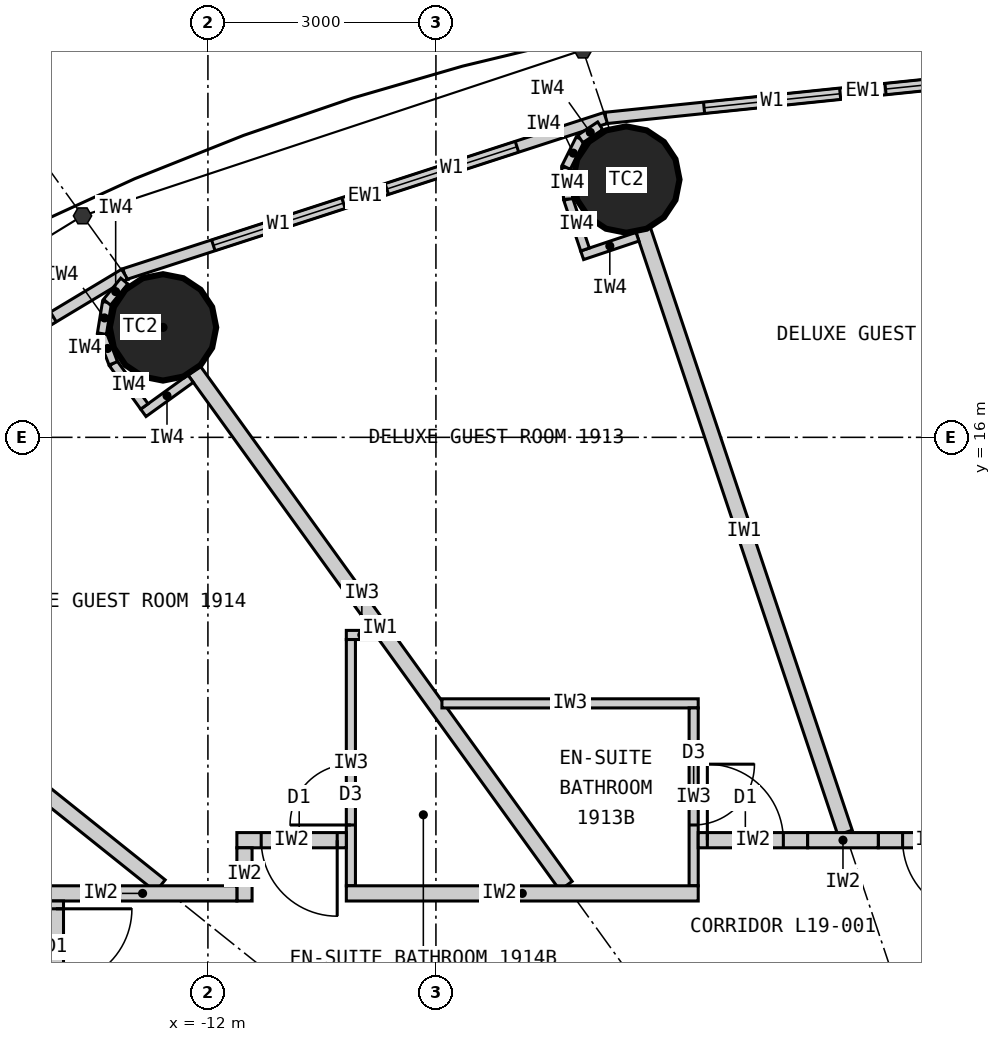
"""IFC4 building model, lengths in metres.
Left out: names, types, materials, properties, quantities, classifications, styles, units other than length and angle.
Written with IfcOpenShell. Run it as: python <this file> out.ifc"""

import sys

from ifc_helpers import new_model, si_unit, direction, frame, frame_2d, origin, origin_2d, place, context, subcontext, project, spatial, rectangle, circle, extrude, element, fill, save


model = new_model("IFC4")
c1 = context("Model", 3, precision=1e-05, world=origin(), true_north=direction((0.0, 1.0)))
c2 = subcontext(c1, "Body", "Model", "MODEL_VIEW")
j1 = project(units=[si_unit("LENGTHUNIT", "METRE"), si_unit("PLANEANGLEUNIT", "RADIAN")], contexts=[c1])
p1 = place(None, origin())
s1 = spatial("IfcSite", under=j1, at=p1, CompositionType="ELEMENT")
p2 = place(p1, origin())
s2 = spatial("IfcBuilding", under=s1, at=p2, CompositionType="ELEMENT")
p3 = place(p2, frame((0.0, 0.0, 77.1)))
s3 = spatial("IfcBuildingStorey", under=s2, at=p3, CompositionType="ELEMENT", Elevation=77.1)
for number, where, z_axis, x_axis in (
    (1, (-6.495, 19.391, 0.0), (0.0, 0.0, 1.0), (1.0, 0.0, 0.0)),
    (2, (-12.591, 17.447, 0.0), (0.0, 0.0, 1.0), (1.0, 0.0, 0.0)),
):
    element("IfcColumn", number, at=place(p3, frame(where, z_axis=z_axis, x_axis=x_axis)), inside=s3, PredefinedType="COLUMN", context=c2, shape_type="SweptSolid", body=[
        extrude(circle(Radius=0.7, at=origin_2d()), origin(), (0.0, 0.0, 1.0), 3.3),
    ])
p4 = place(p3, frame((0.0, 20.9, 0.0), z_axis=(0.0, 0.0, 1.0), x_axis=(-0.994721394369, -0.102612609291, 0.0)))
e3 = element("IfcWall", 3, at=p4, inside=s3, PredefinedType="ELEMENTEDWALL", context=c2, shape_type="SweptSolid", body=[
    extrude(rectangle(XDim=6.802, YDim=0.15, at=frame_2d((3.401, 0.0))), origin(), (0.0, 0.0, 1.0), 3.12),
])
p5 = place(p4, frame((1.301, 0.0, 0.9)))
e4 = element("IfcOpeningElement", 4, at=p5, cuts=e3, PredefinedType="OPENING", context=c2, shape_type="SweptSolid", body=[
    extrude(rectangle(XDim=1.8, YDim=1.9, at=frame_2d((0.9, 0.95))), frame((0.0, 0.085, 0.0), z_axis=(0.0, -1.0, 0.0), x_axis=(1.0, 0.0, 0.0)), (0.0, 0.0, 1.0), 0.17),
])
p6 = place(p4, frame((3.701, 0.0, 0.9)))
e5 = element("IfcOpeningElement", 5, at=p6, cuts=e3, PredefinedType="OPENING", context=c2, shape_type="SweptSolid", body=[
    extrude(rectangle(XDim=1.8, YDim=1.9, at=frame_2d((0.9, 0.95))), frame((0.0, 0.085, 0.0), z_axis=(0.0, -1.0, 0.0), x_axis=(1.0, 0.0, 0.0)), (0.0, 0.0, 1.0), 0.17),
])
p7 = place(p3, frame((-6.766, 20.202, 0.0), z_axis=(0.0, 0.0, 1.0), x_axis=(-0.951137534625, -0.308767534285, 0.0)))
e6 = element("IfcWall", 6, at=p7, inside=s3, PredefinedType="ELEMENTEDWALL", context=c2, shape_type="SweptSolid", body=[
    extrude(rectangle(XDim=6.655, YDim=0.15, at=frame_2d((3.328, 0.0))), origin(), (0.0, 0.0, 1.0), 3.12),
])
p8 = place(p7, frame((1.228, 0.0, 0.9)))
e7 = element("IfcOpeningElement", 7, at=p8, cuts=e6, PredefinedType="OPENING", context=c2, shape_type="SweptSolid", body=[
    extrude(rectangle(XDim=1.8, YDim=1.9, at=frame_2d((0.9, 0.95))), frame((0.0, 0.085, 0.0), z_axis=(0.0, -1.0, 0.0), x_axis=(1.0, 0.0, 0.0)), (0.0, 0.0, 1.0), 0.17),
])
p9 = place(p7, frame((3.628, 0.0, 0.9)))
e8 = element("IfcOpeningElement", 8, at=p9, cuts=e6, PredefinedType="OPENING", context=c2, shape_type="SweptSolid", body=[
    extrude(rectangle(XDim=1.8, YDim=1.9, at=frame_2d((0.9, 0.95))), frame((0.0, 0.085, 0.0), z_axis=(0.0, -1.0, 0.0), x_axis=(1.0, 0.0, 0.0)), (0.0, 0.0, 1.0), 0.17),
])
p10 = place(p3, frame((-13.096, 18.147, 0.0), z_axis=(0.0, 0.0, 1.0), x_axis=(-0.856983180864, -0.515344377787, 0.0)))
e9 = element("IfcWall", 9, at=p10, inside=s3, PredefinedType="ELEMENTEDWALL", context=c2, shape_type="SweptSolid", body=[
    extrude(rectangle(XDim=6.386, YDim=0.15, at=frame_2d((3.193, 0.0))), origin(), (0.0, 0.0, 1.0), 3.12),
])
p11 = place(p10, frame((1.093, 0.0, 0.9)))
e10 = element("IfcOpeningElement", 10, at=p11, cuts=e9, PredefinedType="OPENING", context=c2, shape_type="SweptSolid", body=[
    extrude(rectangle(XDim=1.8, YDim=1.9, at=frame_2d((0.9, 0.95))), frame((0.0, 0.085, 0.0), z_axis=(0.0, -1.0, 0.0), x_axis=(1.0, 0.0, 0.0)), (0.0, 0.0, 1.0), 0.17),
])
p12 = place(p10, frame((3.493, 0.0, 0.9)))
e11 = element("IfcOpeningElement", 11, at=p12, cuts=e9, PredefinedType="OPENING", context=c2, shape_type="SweptSolid", body=[
    extrude(rectangle(XDim=1.8, YDim=1.9, at=frame_2d((0.9, 0.95))), frame((0.0, 0.085, 0.0), z_axis=(0.0, -1.0, 0.0), x_axis=(1.0, 0.0, 0.0)), (0.0, 0.0, 1.0), 0.17),
])
p13 = place(p3, frame((-3.617, 10.8, 0.0), z_axis=(0.0, 0.0, 1.0), x_axis=(-0.317576599239, 0.948232621046, 0.0)))
e12 = element("IfcWall", 12, at=p13, inside=s3, PredefinedType="PARTITIONING", context=c2, shape_type="SweptSolid", body=[
    extrude(rectangle(XDim=8.36, YDim=0.2, at=frame_2d((4.18, 0.0))), origin(), (0.0, 0.0, 1.0), 2.32),
])
p14 = place(p3, frame((-7.289, 10.1, 0.0), z_axis=(0.0, 0.0, 1.0), x_axis=(-0.585198353053, 0.810890182197, 0.0)))
e13 = element("IfcWall", 13, at=p14, inside=s3, PredefinedType="PARTITIONING", context=c2, shape_type="SweptSolid", body=[
    extrude(rectangle(XDim=8.36, YDim=0.2, at=frame_2d((4.18, 0.0))), origin(), (0.0, 0.0, 1.0), 2.32),
])
p15 = place(p3, frame((-12.625, 10.1, 0.0), z_axis=(0.0, 0.0, 1.0), x_axis=(-0.780892451574, 0.624665493744, 0.0)))
e14 = element("IfcWall", 14, at=p15, inside=s3, PredefinedType="PARTITIONING", context=c2, shape_type="SweptSolid", body=[
    extrude(rectangle(XDim=6.045, YDim=0.2, at=frame_2d((3.022, 0.0))), origin(), (0.0, 0.0, 1.0), 2.32),
])
p16 = place(p3, frame((-8.921, 12.5, 0.0), z_axis=(0.0, 0.0, 1.0), x_axis=(1.0, 0.0, 0.0)))
e15 = element("IfcWall", 15, at=p16, inside=s3, PredefinedType="PARTITIONING", context=c2, shape_type="SweptSolid", body=[
    extrude(rectangle(XDim=3.372, YDim=0.12, at=frame_2d((1.686, 0.0))), origin(), (0.0, 0.0, 1.0), 3.12),
])
p17 = place(p3, frame((-5.609, 10.1, 0.0), z_axis=(0.0, 0.0, 1.0), x_axis=(0.0, 1.0, 0.0)))
e16 = element("IfcWall", 16, at=p17, inside=s3, PredefinedType="PARTITIONING", context=c2, shape_type="SweptSolid", body=[
    extrude(rectangle(XDim=2.34, YDim=0.12, at=frame_2d((1.17, 0.0))), origin(), (0.0, 0.0, 1.0), 3.12),
])
p18 = place(p17, frame((0.8, 0.0, 0.0)))
e17 = element("IfcOpeningElement", 17, at=p18, cuts=e16, PredefinedType="OPENING", context=c2, shape_type="SweptSolid", body=[
    extrude(rectangle(XDim=0.8, YDim=2.1, at=frame_2d((0.4, 1.05))), frame((0.0, 0.07, 0.0), z_axis=(0.0, -1.0, 0.0), x_axis=(1.0, 0.0, 0.0)), (0.0, 0.0, 1.0), 0.14),
])
p19 = place(p3, frame((-9.771, 13.4, 0.0), z_axis=(0.0, 0.0, 1.0), x_axis=(-1.0, 0.0, 0.0)))
e18 = element("IfcWall", 18, at=p19, inside=s3, PredefinedType="PARTITIONING", context=c2, shape_type="SweptSolid", body=[
    extrude(rectangle(XDim=0.408, YDim=0.12, at=frame_2d((0.204, 0.0))), origin(), (0.0, 0.0, 1.0), 3.12),
])
p20 = place(p3, frame((-10.119, 10.1, 0.0), z_axis=(0.0, 0.0, 1.0), x_axis=(0.0, 1.0, 0.0)))
e19 = element("IfcWall", 19, at=p20, inside=s3, PredefinedType="PARTITIONING", context=c2, shape_type="SweptSolid", body=[
    extrude(rectangle(XDim=3.24, YDim=0.12, at=frame_2d((1.62, 0.0))), origin(), (0.0, 0.0, 1.0), 3.12),
])
p21 = place(p20, frame((0.8, 0.0, 0.0)))
e20 = element("IfcOpeningElement", 20, at=p21, cuts=e19, PredefinedType="OPENING", context=c2, shape_type="SweptSolid", body=[
    extrude(rectangle(XDim=0.8, YDim=2.1, at=frame_2d((0.4, 1.05))), frame((0.0, 0.07, 0.0), z_axis=(0.0, -1.0, 0.0), x_axis=(1.0, 0.0, 0.0)), (0.0, 0.0, 1.0), 0.14),
])
p22 = place(p3, frame((-3.18, 10.7, 0.0), z_axis=(0.0, 0.0, 1.0), x_axis=(1.0, 0.0, 0.0)))
e21 = element("IfcWall", 21, at=p22, inside=s3, PredefinedType="PARTITIONING", context=c2, shape_type="SweptSolid", body=[
    extrude(rectangle(XDim=1.44, YDim=0.2, at=frame_2d((0.72, 0.0))), origin(), (0.0, 0.0, 1.0), 3.12),
])
p23 = place(p22, frame((0.32, 0.0, 0.0)))
e22 = element("IfcOpeningElement", 22, at=p23, cuts=e21, PredefinedType="OPENING", context=c2, shape_type="SweptSolid", body=[
    extrude(rectangle(XDim=1.0, YDim=2.2, at=frame_2d((0.5, 1.1))), frame((0.0, 0.11, 0.0), z_axis=(0.0, -1.0, 0.0), x_axis=(1.0, 0.0, 0.0)), (0.0, 0.0, 1.0), 0.22),
])
p24 = place(p3, frame((-5.549, 10.7, 0.0), z_axis=(0.0, 0.0, 1.0), x_axis=(1.0, 0.0, 0.0)))
e23 = element("IfcWall", 23, at=p24, inside=s3, PredefinedType="PARTITIONING", context=c2, shape_type="SweptSolid", body=[
    extrude(rectangle(XDim=1.44, YDim=0.2, at=frame_2d((0.72, 0.0))), origin(), (0.0, 0.0, 1.0), 3.12),
])
p25 = place(p24, frame((0.12, 0.0, 0.0)))
e24 = element("IfcOpeningElement", 24, at=p25, cuts=e23, PredefinedType="OPENING", context=c2, shape_type="SweptSolid", body=[
    extrude(rectangle(XDim=1.0, YDim=2.2, at=frame_2d((0.5, 1.1))), frame((0.0, 0.11, 0.0), z_axis=(0.0, -1.0, 0.0), x_axis=(1.0, 0.0, 0.0)), (0.0, 0.0, 1.0), 0.22),
])
p26 = place(p3, frame((-11.619, 10.7, 0.0), z_axis=(0.0, 0.0, 1.0), x_axis=(1.0, 0.0, 0.0)))
e25 = element("IfcWall", 25, at=p26, inside=s3, PredefinedType="PARTITIONING", context=c2, shape_type="SweptSolid", body=[
    extrude(rectangle(XDim=1.44, YDim=0.2, at=frame_2d((0.72, 0.0))), origin(), (0.0, 0.0, 1.0), 3.12),
])
p27 = place(p26, frame((0.32, 0.0, 0.0)))
e26 = element("IfcOpeningElement", 26, at=p27, cuts=e25, PredefinedType="OPENING", context=c2, shape_type="SweptSolid", body=[
    extrude(rectangle(XDim=1.0, YDim=2.2, at=frame_2d((0.5, 1.1))), frame((0.0, 0.11, 0.0), z_axis=(0.0, -1.0, 0.0), x_axis=(1.0, 0.0, 0.0)), (0.0, 0.0, 1.0), 0.22),
])
p28 = place(p3, frame((-11.519, 9.9, 0.0), z_axis=(0.0, 0.0, 1.0), x_axis=(0.0, 1.0, 0.0)))
e27 = element("IfcWall", 27, at=p28, inside=s3, PredefinedType="PARTITIONING", context=c2, shape_type="SweptSolid", body=[
    extrude(rectangle(XDim=0.7, YDim=0.2, at=frame_2d((0.35, 0.0))), origin(), (0.0, 0.0, 1.0), 3.12),
])
p29 = place(p3, frame((-4.109, 10.7, 0.0), z_axis=(0.0, 0.0, 1.0), x_axis=(1.0, 0.0, 0.0)))
e28 = element("IfcWall", 28, at=p29, inside=s3, PredefinedType="PARTITIONING", context=c2, shape_type="SweptSolid", body=[
    extrude(rectangle(XDim=0.929, YDim=0.2, at=frame_2d((0.465, 0.0))), origin(), (0.0, 0.0, 1.0), 3.12),
])
p30 = place(p3, frame((-14.1, 10.0, 0.0), z_axis=(0.0, 0.0, 1.0), x_axis=(1.0, 0.0, 0.0)))
e29 = element("IfcWall", 29, at=p30, inside=s3, PredefinedType="PARTITIONING", context=c2, shape_type="SweptSolid", body=[
    extrude(rectangle(XDim=2.481, YDim=0.2, at=frame_2d((1.24, 0.0))), origin(), (0.0, 0.0, 1.0), 3.12),
])
p31 = place(p3, frame((-10.179, 10.0, 0.0), z_axis=(0.0, 0.0, 1.0), x_axis=(1.0, 0.0, 0.0)))
e30 = element("IfcWall", 30, at=p31, inside=s3, PredefinedType="PARTITIONING", context=c2, shape_type="SweptSolid", body=[
    extrude(rectangle(XDim=4.63, YDim=0.2, at=frame_2d((2.315, 0.0))), origin(), (0.0, 0.0, 1.0), 3.12),
])
p32 = place(p3, frame((-14.0, 9.9, 0.0), z_axis=(0.0, 0.0, 1.0), x_axis=(0.0, -1.0, 0.0)))
e31 = element("IfcWall", 31, at=p32, inside=s3, PredefinedType="PARTITIONING", context=c2, shape_type="SweptSolid", body=[
    extrude(rectangle(XDim=5.127, YDim=0.2, at=frame_2d((2.564, 0.0))), origin(), (0.0, 0.0, 1.0), 3.12),
])
p33 = place(p32, frame((0.103, 0.0, 0.0)))
e32 = element("IfcOpeningElement", 32, at=p33, cuts=e31, PredefinedType="OPENING", context=c2, shape_type="SweptSolid", body=[
    extrude(rectangle(XDim=1.0, YDim=2.2, at=frame_2d((0.5, 1.1))), frame((0.0, 0.11, 0.0), z_axis=(0.0, -1.0, 0.0), x_axis=(1.0, 0.0, 0.0)), (0.0, 0.0, 1.0), 0.22),
])
p34 = place(p3, frame((-6.348, 18.639, 0.0), z_axis=(0.0, 0.0, 1.0), x_axis=(-0.948268951266, -0.317468102437, 0.0)))
e33 = element("IfcWall", 33, at=p34, inside=s3, PredefinedType="PARTITIONING", context=c2, shape_type="SweptSolid", body=[
    extrude(rectangle(XDim=0.768, YDim=0.12, at=frame_2d((0.384, 0.0))), origin(), (0.0, 0.0, 1.0), 3.12),
])
p35 = place(p3, frame((-7.038, 18.471, 0.0), z_axis=(0.0, 0.0, 1.0), x_axis=(-0.317378466199, 0.9482989556, 0.0)))
e34 = element("IfcWall", 34, at=p35, inside=s3, PredefinedType="PARTITIONING", context=c2, shape_type="SweptSolid", body=[
    extrude(rectangle(XDim=0.7, YDim=0.12, at=frame_2d((0.35, 0.0))), origin(), (0.0, 0.0, 1.0), 3.12),
])
p36 = place(p3, frame((-7.26, 19.135, 0.0), z_axis=(0.0, 0.0, 1.0), x_axis=(-0.0613238046, 0.99811792439, 0.0)))
e35 = element("IfcWall", 35, at=p36, inside=s3, PredefinedType="PARTITIONING", context=c2, shape_type="SweptSolid", body=[
    extrude(rectangle(XDim=0.418, YDim=0.12, at=frame_2d((0.209, 0.0))), origin(), (0.0, 0.0, 1.0), 3.12),
])
p37 = place(p3, frame((-7.286, 19.552, 0.0), z_axis=(0.0, 0.0, 1.0), x_axis=(0.445810757773, 0.89512723579, 0.0)))
e36 = element("IfcWall", 36, at=p37, inside=s3, PredefinedType="PARTITIONING", context=c2, shape_type="SweptSolid", body=[
    extrude(rectangle(XDim=0.418, YDim=0.12, at=frame_2d((0.209, 0.0))), origin(), (0.0, 0.0, 1.0), 3.12),
])
p38 = place(p3, frame((-7.1, 19.926, 0.0), z_axis=(0.0, 0.0, 1.0), x_axis=(0.833488262509, 0.552537162787, 0.0)))
e37 = element("IfcWall", 37, at=p38, inside=s3, PredefinedType="PARTITIONING", context=c2, shape_type="SweptSolid", body=[
    extrude(rectangle(XDim=0.313, YDim=0.12, at=frame_2d((0.156, 0.0))), origin(), (0.0, 0.0, 1.0), 3.12),
])
p39 = place(p3, frame((-12.227, 16.772, 0.0), z_axis=(0.0, 0.0, 1.0), x_axis=(-0.810821798253, -0.585293098778, 0.0)))
e38 = element("IfcWall", 38, at=p39, inside=s3, PredefinedType="PARTITIONING", context=c2, shape_type="SweptSolid", body=[
    extrude(rectangle(XDim=0.768, YDim=0.12, at=frame_2d((0.384, 0.0))), origin(), (0.0, 0.0, 1.0), 3.12),
])
p40 = place(p3, frame((-12.836, 16.406, 0.0), z_axis=(0.0, 0.0, 1.0), x_axis=(-0.585223113993, 0.810872312296, 0.0)))
e39 = element("IfcWall", 39, at=p40, inside=s3, PredefinedType="PARTITIONING", context=c2, shape_type="SweptSolid", body=[
    extrude(rectangle(XDim=0.7, YDim=0.12, at=frame_2d((0.35, 0.0))), origin(), (0.0, 0.0, 1.0), 3.12),
])
p41 = place(p3, frame((-13.246, 16.974, 0.0), z_axis=(0.0, 0.0, 1.0), x_axis=(-0.355728122235, 0.934589483705, 0.0)))
e40 = element("IfcWall", 40, at=p41, inside=s3, PredefinedType="PARTITIONING", context=c2, shape_type="SweptSolid", body=[
    extrude(rectangle(XDim=0.418, YDim=0.12, at=frame_2d((0.209, 0.0))), origin(), (0.0, 0.0, 1.0), 3.12),
])
p42 = place(p3, frame((-13.394, 17.365, 0.0), z_axis=(0.0, 0.0, 1.0), x_axis=(0.159379276926, 0.987217425943, 0.0)))
e41 = element("IfcWall", 41, at=p42, inside=s3, PredefinedType="PARTITIONING", context=c2, shape_type="SweptSolid", body=[
    extrude(rectangle(XDim=0.418, YDim=0.12, at=frame_2d((0.209, 0.0))), origin(), (0.0, 0.0, 1.0), 3.12),
])
p43 = place(p3, frame((-13.328, 17.777, 0.0), z_axis=(0.0, 0.0, 1.0), x_axis=(0.632276783541, 0.774742582407, 0.0)))
e42 = element("IfcWall", 42, at=p43, inside=s3, PredefinedType="PARTITIONING", context=c2, shape_type="SweptSolid", body=[
    extrude(rectangle(XDim=0.36, YDim=0.12, at=frame_2d((0.18, 0.0))), origin(), (0.0, 0.0, 1.0), 3.12),
])
p44 = place(p5, origin())
e43 = element("IfcWindow", 43, at=p44, inside=s3, PartitioningType="SINGLE_PANEL", PredefinedType="WINDOW", context=c2, shape_type="SweptSolid", body=[
    extrude(rectangle(XDim=1.8, YDim=1.9, at=frame_2d((0.9, 0.95))), frame((0.0, 0.03, 0.0), z_axis=(0.0, -1.0, 0.0), x_axis=(1.0, 0.0, 0.0)), (0.0, 0.0, 1.0), 0.06),
])
fill(e4, e43)
p45 = place(p6, origin())
e44 = element("IfcWindow", 44, at=p45, inside=s3, PartitioningType="SINGLE_PANEL", PredefinedType="WINDOW", context=c2, shape_type="SweptSolid", body=[
    extrude(rectangle(XDim=1.8, YDim=1.9, at=frame_2d((0.9, 0.95))), frame((0.0, 0.03, 0.0), z_axis=(0.0, -1.0, 0.0), x_axis=(1.0, 0.0, 0.0)), (0.0, 0.0, 1.0), 0.06),
])
fill(e5, e44)
p46 = place(p8, origin())
e45 = element("IfcWindow", 45, at=p46, inside=s3, PartitioningType="SINGLE_PANEL", PredefinedType="WINDOW", context=c2, shape_type="SweptSolid", body=[
    extrude(rectangle(XDim=1.8, YDim=1.9, at=frame_2d((0.9, 0.95))), frame((0.0, 0.03, 0.0), z_axis=(0.0, -1.0, 0.0), x_axis=(1.0, 0.0, 0.0)), (0.0, 0.0, 1.0), 0.06),
])
fill(e7, e45)
p47 = place(p9, origin())
e46 = element("IfcWindow", 46, at=p47, inside=s3, PartitioningType="SINGLE_PANEL", PredefinedType="WINDOW", context=c2, shape_type="SweptSolid", body=[
    extrude(rectangle(XDim=1.8, YDim=1.9, at=frame_2d((0.9, 0.95))), frame((0.0, 0.03, 0.0), z_axis=(0.0, -1.0, 0.0), x_axis=(1.0, 0.0, 0.0)), (0.0, 0.0, 1.0), 0.06),
])
fill(e8, e46)
p48 = place(p11, origin())
e47 = element("IfcWindow", 47, at=p48, inside=s3, PartitioningType="SINGLE_PANEL", PredefinedType="WINDOW", context=c2, shape_type="SweptSolid", body=[
    extrude(rectangle(XDim=1.8, YDim=1.9, at=frame_2d((0.9, 0.95))), frame((0.0, 0.03, 0.0), z_axis=(0.0, -1.0, 0.0), x_axis=(1.0, 0.0, 0.0)), (0.0, 0.0, 1.0), 0.06),
])
fill(e10, e47)
p49 = place(p23, origin())
e48 = element("IfcDoor", 48, at=p49, inside=s3, OperationType="SINGLE_SWING_RIGHT", PredefinedType="DOOR", context=c2, shape_type="SweptSolid", body=[
    extrude(rectangle(XDim=1.0, YDim=2.2, at=frame_2d((0.5, 1.1))), frame((0.0, 0.025, 0.0), z_axis=(0.0, -1.0, 0.0), x_axis=(1.0, 0.0, 0.0)), (0.0, 0.0, 1.0), 0.05),
])
fill(e22, e48)
p50 = place(p18, origin())
e49 = element("IfcDoor", 49, at=p50, inside=s3, OperationType="SINGLE_SWING_RIGHT", PredefinedType="DOOR", context=c2, shape_type="SweptSolid", body=[
    extrude(rectangle(XDim=0.8, YDim=2.1, at=frame_2d((0.4, 1.05))), frame((0.0, 0.025, 0.0), z_axis=(0.0, -1.0, 0.0), x_axis=(1.0, 0.0, 0.0)), (0.0, 0.0, 1.0), 0.05),
])
fill(e17, e49)
p51 = place(p25, origin())
e50 = element("IfcDoor", 50, at=p51, inside=s3, OperationType="SINGLE_SWING_LEFT", PredefinedType="DOOR", context=c2, shape_type="SweptSolid", body=[
    extrude(rectangle(XDim=1.0, YDim=2.2, at=frame_2d((0.5, 1.1))), frame((0.0, 0.025, 0.0), z_axis=(0.0, -1.0, 0.0), x_axis=(1.0, 0.0, 0.0)), (0.0, 0.0, 1.0), 0.05),
])
fill(e24, e50)
p52 = place(p21, origin())
e51 = element("IfcDoor", 51, at=p52, inside=s3, OperationType="SINGLE_SWING_LEFT", PredefinedType="DOOR", context=c2, shape_type="SweptSolid", body=[
    extrude(rectangle(XDim=0.8, YDim=2.1, at=frame_2d((0.4, 1.05))), frame((0.0, 0.025, 0.0), z_axis=(0.0, -1.0, 0.0), x_axis=(1.0, 0.0, 0.0)), (0.0, 0.0, 1.0), 0.05),
])
fill(e20, e51)
p53 = place(p27, origin())
e52 = element("IfcDoor", 52, at=p53, inside=s3, OperationType="SINGLE_SWING_RIGHT", PredefinedType="DOOR", context=c2, shape_type="SweptSolid", body=[
    extrude(rectangle(XDim=1.0, YDim=2.2, at=frame_2d((0.5, 1.1))), frame((0.0, 0.025, 0.0), z_axis=(0.0, -1.0, 0.0), x_axis=(1.0, 0.0, 0.0)), (0.0, 0.0, 1.0), 0.05),
])
fill(e26, e52)
p54 = place(p33, origin())
e53 = element("IfcDoor", 53, at=p54, inside=s3, OperationType="SINGLE_SWING_LEFT", PredefinedType="DOOR", context=c2, shape_type="SweptSolid", body=[
    extrude(rectangle(XDim=1.0, YDim=2.2, at=frame_2d((0.5, 1.1))), frame((0.0, 0.025, 0.0), z_axis=(0.0, -1.0, 0.0), x_axis=(1.0, 0.0, 0.0)), (0.0, 0.0, 1.0), 0.05),
])
fill(e32, e53)
save(model, sys.argv[1])
